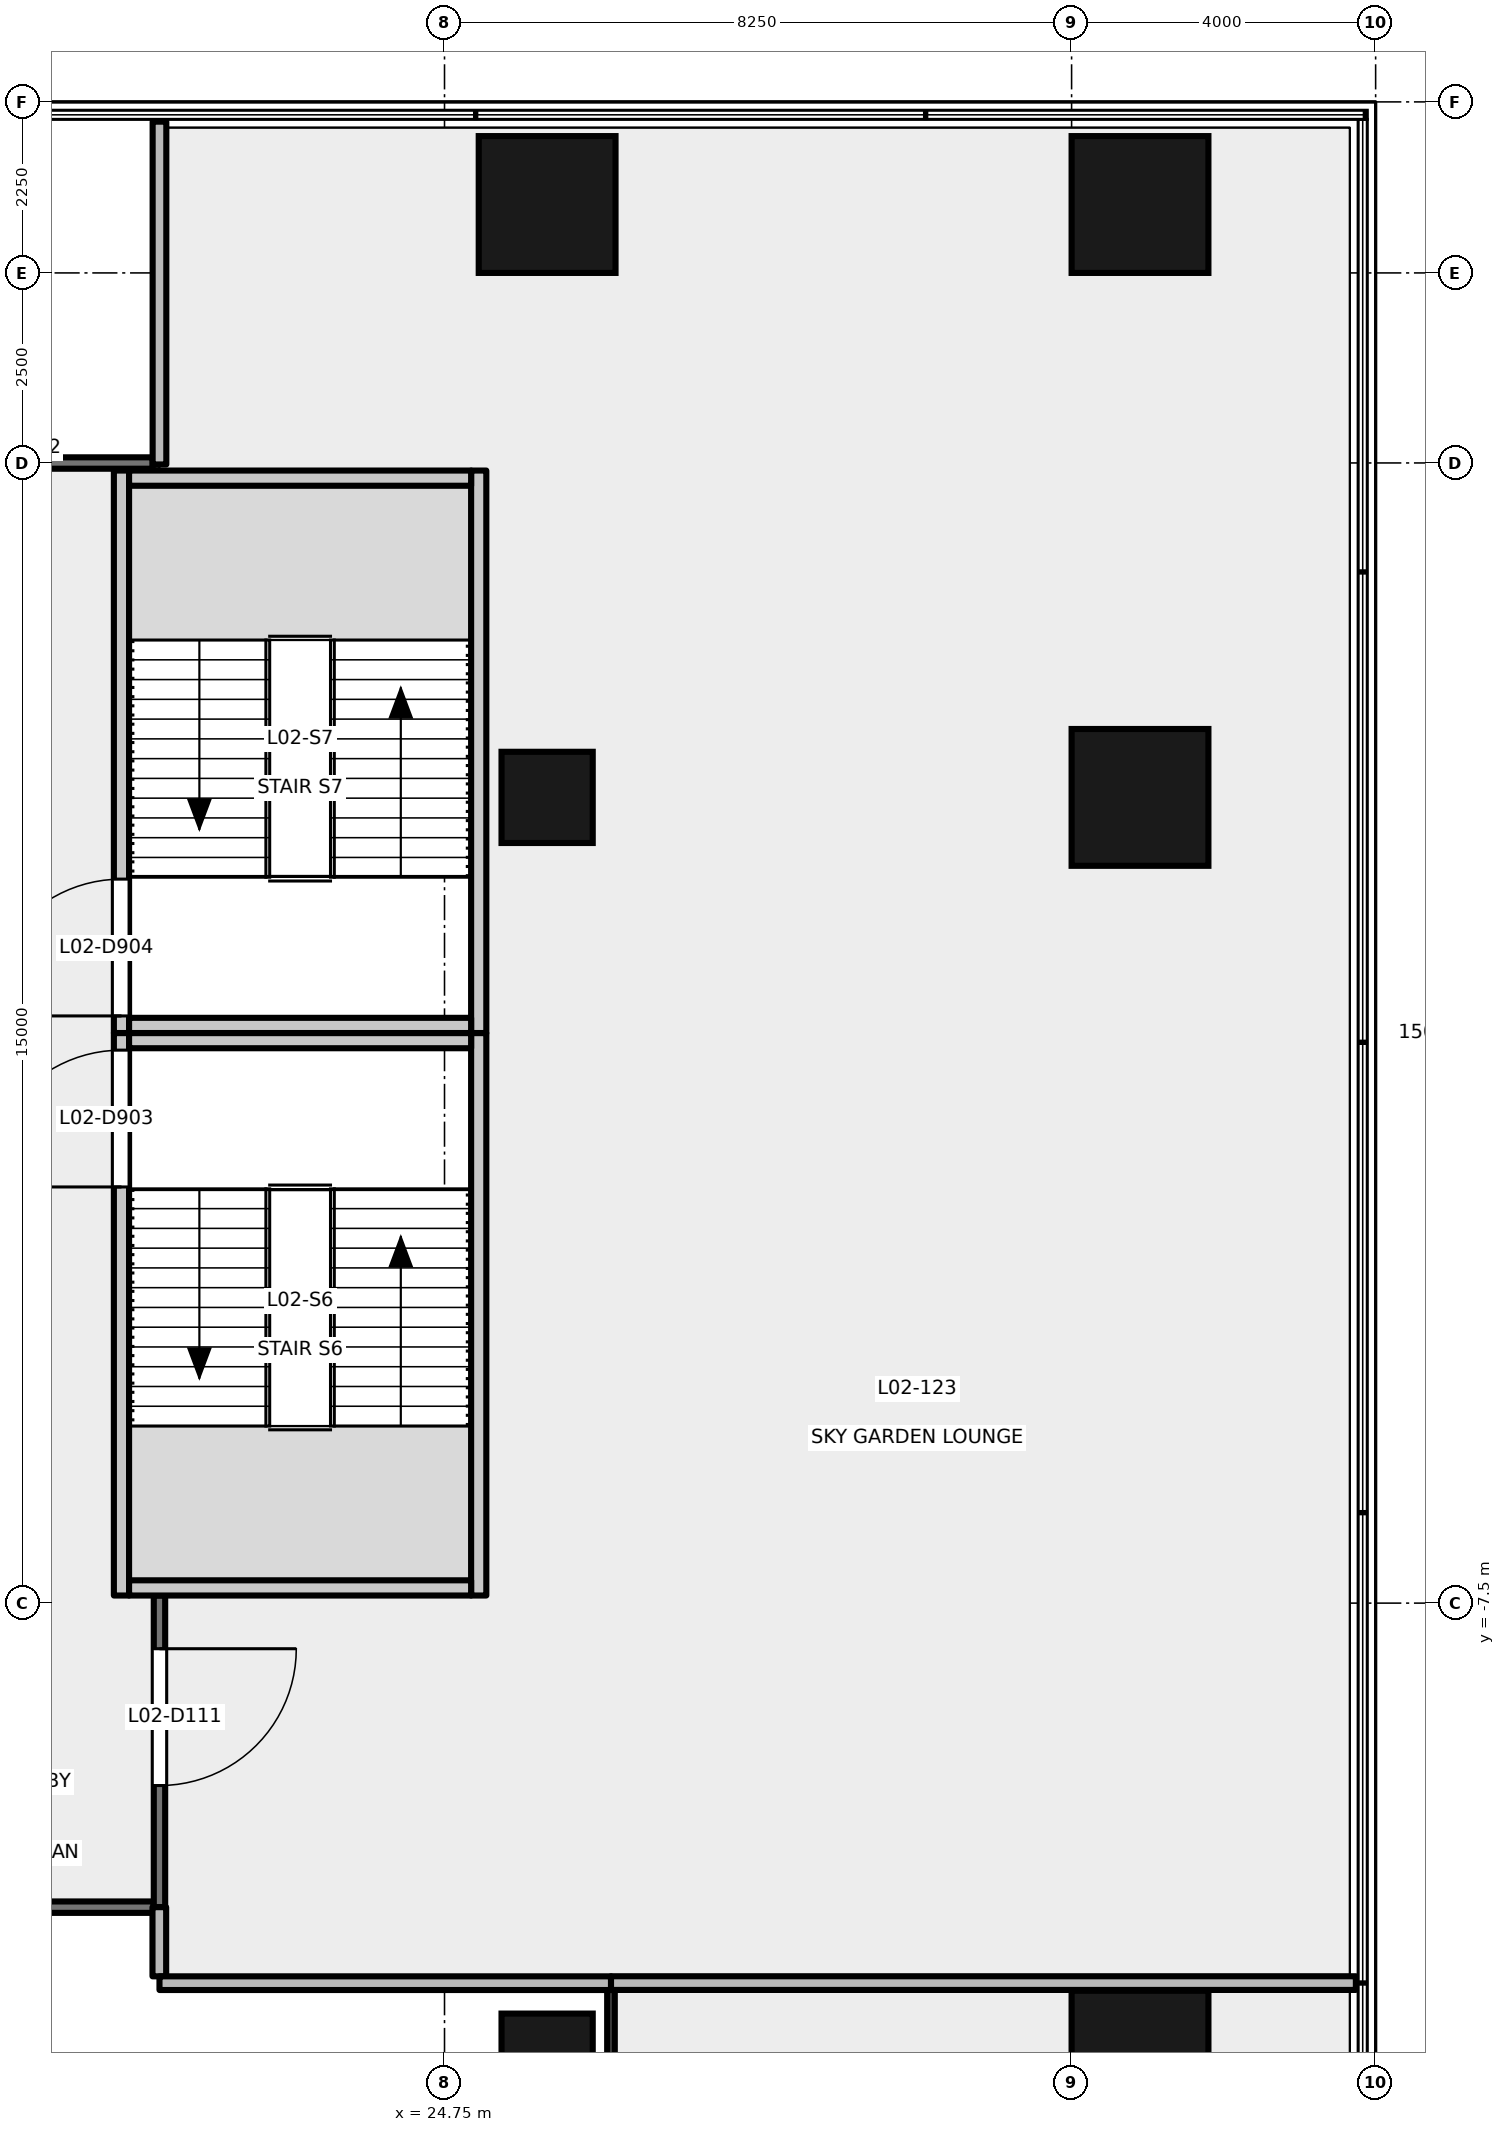
"""IFC4 building model, lengths in metres.
Left out: names, types, materials, properties, quantities, classifications, styles, units other than length and angle.
Written with IfcOpenShell. Run it as: python <this file> out.ifc"""

import sys

from ifc_helpers import new_model, si_unit, direction, frame, frame_2d, origin, origin_2d, place, context, subcontext, project, spatial, rectangle, extrude, element, fill, save


model = new_model("IFC4")
c1 = context("Model", 3, precision=1e-05, world=origin(), true_north=direction((0.0, 1.0)))
c2 = subcontext(c1, "Body", "Model", "MODEL_VIEW")
j1 = project(units=[si_unit("LENGTHUNIT", "METRE"), si_unit("PLANEANGLEUNIT", "RADIAN")], contexts=[c1])
p1 = place(None, origin())
s1 = spatial("IfcSite", under=j1, at=p1, CompositionType="ELEMENT")
p2 = place(p1, origin())
s2 = spatial("IfcBuilding", under=s1, at=p2, CompositionType="ELEMENT")
p3 = place(p2, frame((0.0, 0.0, 12.6)))
s3 = spatial("IfcBuildingStorey", under=s2, at=p3, CompositionType="ELEMENT", Elevation=12.6)
for number, where, z_axis, x_axis in (
    (1, (33.9, 10.9, -0.2), (0.0, 0.0, 1.0), (1.0, 0.0, 0.0)),
    (2, (33.9, -13.5, -0.2), (0.0, 0.0, 1.0), (0.0, 1.0, 0.0)),
    (3, (33.9, 3.1, -0.2), (0.0, 0.0, 1.0), (0.0, 1.0, 0.0)),
    (4, (26.1, 10.9, -0.2), (0.0, 0.0, 1.0), (1.0, 0.0, 0.0)),
):
    element("IfcColumn", number, at=place(p3, frame(where, z_axis=z_axis, x_axis=x_axis)), inside=s3, PredefinedType="COLUMN", context=c2, shape_type="SweptSolid", body=[
        extrude(rectangle(XDim=1.8, YDim=1.8, at=origin_2d()), origin(), (0.0, 0.0, 1.0), 4.8),
    ])
for number, where, z_axis, x_axis in (
    (5, (26.1, -13.5, -0.2), (0.0, 0.0, 1.0), (1.0, 0.0, 0.0)),
    (6, (26.1, 3.1, -0.2), (0.0, 0.0, 1.0), (1.0, 0.0, 0.0)),
):
    element("IfcColumn", number, at=place(p3, frame(where, z_axis=z_axis, x_axis=x_axis)), inside=s3, PredefinedType="COLUMN", context=c2, shape_type="SweptSolid", body=[
        extrude(rectangle(XDim=1.2, YDim=1.2, at=origin_2d()), origin(), (0.0, 0.0, 1.0), 4.8),
    ])
p4 = place(p3, frame((20.5, -7.4, -0.2), z_axis=(0.0, 0.0, 1.0), x_axis=(0.0, 1.0, 0.0)))
e7 = element("IfcWall", 7, at=p4, inside=s3, PredefinedType="SHEAR", context=c2, shape_type="SweptSolid", body=[
    extrude(rectangle(XDim=7.4, YDim=0.2, at=frame_2d((3.7, 0.0))), origin(), (0.0, 0.0, 1.0), 4.8),
])
p5 = place(p4, frame((5.375, 0.0, 0.2)))
e8 = element("IfcOpeningElement", 8, at=p5, cuts=e7, PredefinedType="OPENING", context=c2, shape_type="SweptSolid", body=[
    extrude(rectangle(XDim=1.8, YDim=2.1, at=frame_2d((0.9, 1.05))), frame((0.0, 0.111, 0.0), z_axis=(0.0, -1.0, 0.0), x_axis=(1.0, 0.0, 0.0)), (0.0, 0.0, 1.0), 0.221),
])
p6 = place(p3, frame((25.2, -7.4, -0.2), z_axis=(0.0, 0.0, 1.0), x_axis=(0.0, 1.0, 0.0)))
e9 = element("IfcWall", 9, at=p6, inside=s3, PredefinedType="SHEAR", context=c2, shape_type="SweptSolid", body=[
    extrude(rectangle(XDim=7.4, YDim=0.2, at=frame_2d((3.7, 0.0))), origin(), (0.0, 0.0, 1.0), 4.8),
])
for number, where, z_axis, x_axis in (
    (10, (20.6, -0.1, -0.2), (0.0, 0.0, 1.0), (1.0, 0.0, 0.0)),
    (11, (20.6, -7.3, -0.2), (0.0, 0.0, 1.0), (1.0, 0.0, 0.0)),
):
    element("IfcWall", number, at=place(p3, frame(where, z_axis=z_axis, x_axis=x_axis)), inside=s3, PredefinedType="SHEAR", context=c2, shape_type="SweptSolid", body=[
        extrude(rectangle(XDim=4.5, YDim=0.2, at=frame_2d((2.25, 0.0))), origin(), (0.0, 0.0, 1.0), 4.8),
    ])
p7 = place(p3, frame((20.5, 0.0, -0.2), z_axis=(0.0, 0.0, 1.0), x_axis=(0.0, 1.0, 0.0)))
e12 = element("IfcWall", 12, at=p7, inside=s3, PredefinedType="SHEAR", context=c2, shape_type="SweptSolid", body=[
    extrude(rectangle(XDim=7.4, YDim=0.2, at=frame_2d((3.7, 0.0))), origin(), (0.0, 0.0, 1.0), 4.8),
])
p8 = place(p7, frame((0.225, 0.0, 0.2)))
e13 = element("IfcOpeningElement", 13, at=p8, cuts=e12, PredefinedType="OPENING", context=c2, shape_type="SweptSolid", body=[
    extrude(rectangle(XDim=1.8, YDim=2.1, at=frame_2d((0.9, 1.05))), frame((0.0, 0.111, 0.0), z_axis=(0.0, -1.0, 0.0), x_axis=(1.0, 0.0, 0.0)), (0.0, 0.0, 1.0), 0.221),
])
p9 = place(p3, frame((25.2, 0.0, -0.2), z_axis=(0.0, 0.0, 1.0), x_axis=(0.0, 1.0, 0.0)))
e14 = element("IfcWall", 14, at=p9, inside=s3, PredefinedType="SHEAR", context=c2, shape_type="SweptSolid", body=[
    extrude(rectangle(XDim=7.4, YDim=0.2, at=frame_2d((3.7, 0.0))), origin(), (0.0, 0.0, 1.0), 4.8),
])
for number, where, z_axis, x_axis in (
    (15, (20.6, 7.3, -0.2), (0.0, 0.0, 1.0), (1.0, 0.0, 0.0)),
    (16, (20.6, 0.1, -0.2), (0.0, 0.0, 1.0), (1.0, 0.0, 0.0)),
):
    element("IfcWall", number, at=place(p3, frame(where, z_axis=z_axis, x_axis=x_axis)), inside=s3, PredefinedType="SHEAR", context=c2, shape_type="SweptSolid", body=[
        extrude(rectangle(XDim=4.5, YDim=0.2, at=frame_2d((2.25, 0.0))), origin(), (0.0, 0.0, 1.0), 4.8),
    ])
p10 = place(p3, frame((20.925, -11.5, 0.0), z_axis=(0.0, 0.0, 1.0), x_axis=(-1.0, 0.0, 0.0)))
e17 = element("IfcWall", 17, at=p10, inside=s3, PredefinedType="PARTITIONING", context=c2, shape_type="SweptSolid", body=[
    extrude(rectangle(XDim=2.965, YDim=0.15, at=frame_2d((1.482, 0.0))), origin(), (0.0, 0.0, 1.0), 4.3),
])
p11 = place(p3, frame((21.0, -7.4, 0.0), z_axis=(0.0, 0.0, 1.0), x_axis=(0.0, -1.0, 0.0)))
e18 = element("IfcWall", 18, at=p11, inside=s3, PredefinedType="PARTITIONING", context=c2, shape_type="SweptSolid", body=[
    extrude(rectangle(XDim=4.1, YDim=0.15, at=frame_2d((2.05, 0.0))), origin(), (0.0, 0.0, 1.0), 4.6),
])
p12 = place(p11, frame((0.7, 0.0, 0.0)))
e19 = element("IfcOpeningElement", 19, at=p12, cuts=e18, PredefinedType="OPENING", context=c2, shape_type="SweptSolid", body=[
    extrude(rectangle(XDim=1.8, YDim=2.1, at=frame_2d((0.9, 1.05))), frame((0.0, 0.085, 0.0), z_axis=(0.0, -1.0, 0.0), x_axis=(1.0, 0.0, 0.0)), (0.0, 0.0, 1.0), 0.171),
])
p13 = place(p3, frame((18.0, 7.499, 0.0), z_axis=(0.0, 0.0, 1.0), x_axis=(1.0, 0.0, 0.0)))
e20 = element("IfcWall", 20, at=p13, inside=s3, PredefinedType="PARTITIONING", context=c2, shape_type="SweptSolid", body=[
    extrude(rectangle(XDim=2.91, YDim=0.15, at=frame_2d((1.455, 0.0))), origin(), (0.0, 0.0, 1.0), 4.3),
])
p14 = place(p13, frame((0.628, 0.0, 0.0)))
e21 = element("IfcOpeningElement", 21, at=p14, cuts=e20, PredefinedType="OPENING", context=c2, shape_type="SweptSolid", body=[
    extrude(rectangle(XDim=0.9, YDim=2.1, at=frame_2d((0.45, 1.05))), frame((0.0, 0.085, 0.0), z_axis=(0.0, -1.0, 0.0), x_axis=(1.0, 0.0, 0.0)), (0.0, 0.0, 1.0), 0.171),
])
p15 = place(p3, frame((26.94, -16.25, 0.0), z_axis=(0.0, 0.0, 1.0), x_axis=(0.0, 1.0, 0.0)))
e22 = element("IfcWall", 22, at=p15, inside=s3, PredefinedType="PARTITIONING", context=c2, shape_type="SweptSolid", body=[
    extrude(rectangle(XDim=3.66, YDim=0.1, at=frame_2d((1.83, 0.0))), origin(), (0.0, 0.0, 1.0), 3.6),
])
p16 = place(p15, frame((0.475, 0.0, 0.9)))
e23 = element("IfcOpeningElement", 23, at=p16, cuts=e22, PredefinedType="OPENING", context=c2, shape_type="SweptSolid", body=[
    extrude(rectangle(XDim=1.2, YDim=1.2, at=frame_2d((0.6, 0.6))), frame((0.0, 0.061, 0.0), z_axis=(0.0, -1.0, 0.0), x_axis=(1.0, 0.0, 0.0)), (0.0, 0.0, 1.0), 0.121),
])
p17 = place(p3, frame((26.94, -12.499, 0.0), z_axis=(0.0, 0.0, 1.0), x_axis=(1.0, 0.0, 0.0)))
e24 = element("IfcWall", 24, at=p17, inside=s3, PredefinedType="PARTITIONING", context=c2, shape_type="SweptSolid", body=[
    extrude(rectangle(XDim=9.8, YDim=0.18, at=frame_2d((4.9, 0.0))), origin(), (0.0, 0.0, 1.0), 3.6),
])
p18 = place(p3, frame((20.998, -11.5, 0.0), z_axis=(0.0, 0.0, 1.0), x_axis=(0.0, -1.0, 0.0)))
e25 = element("IfcWall", 25, at=p18, inside=s3, PredefinedType="PARTITIONING", context=c2, shape_type="SweptSolid", body=[
    extrude(rectangle(XDim=0.91, YDim=0.18, at=frame_2d((0.455, 0.0))), origin(), (0.0, 0.0, 1.0), 4.6),
])
p19 = place(p3, frame((21.0, -12.5, 0.0), z_axis=(0.0, 0.0, 1.0), x_axis=(1.0, 0.0, 0.0)))
e26 = element("IfcWall", 26, at=p19, inside=s3, PredefinedType="PARTITIONING", context=c2, shape_type="SweptSolid", body=[
    extrude(rectangle(XDim=5.94, YDim=0.18, at=frame_2d((2.97, 0.0))), origin(), (0.0, 0.0, 1.0), 3.4),
])
p20 = place(p3, frame((21.0, 7.48, 0.0), z_axis=(0.0, 0.0, 1.0), x_axis=(0.0, 1.0, 0.0)))
e27 = element("IfcWall", 27, at=p20, inside=s3, PredefinedType="PARTITIONING", context=c2, shape_type="SweptSolid", body=[
    extrude(rectangle(XDim=4.51, YDim=0.18, at=frame_2d((2.255, 0.0))), origin(), (0.0, 0.0, 1.0), 3.6),
])
p21 = place(p5, origin())
e28 = element("IfcDoor", 28, at=p21, inside=s3, OperationType="DOUBLE_DOOR_SINGLE_SWING", PredefinedType="DOOR", context=c2, shape_type="SweptSolid", body=[
    extrude(rectangle(XDim=1.8, YDim=2.1, at=frame_2d((0.9, 1.05))), frame((0.0, 0.025, 0.0), z_axis=(0.0, -1.0, 0.0), x_axis=(1.0, 0.0, 0.0)), (0.0, 0.0, 1.0), 0.05),
])
fill(e8, e28)
p22 = place(p8, origin())
e29 = element("IfcDoor", 29, at=p22, inside=s3, OperationType="DOUBLE_DOOR_SINGLE_SWING", PredefinedType="DOOR", context=c2, shape_type="SweptSolid", body=[
    extrude(rectangle(XDim=1.8, YDim=2.1, at=frame_2d((0.9, 1.05))), frame((0.0, 0.025, 0.0), z_axis=(0.0, -1.0, 0.0), x_axis=(1.0, 0.0, 0.0)), (0.0, 0.0, 1.0), 0.05),
])
fill(e13, e29)
p23 = place(p12, origin())
e30 = element("IfcDoor", 30, at=p23, inside=s3, OperationType="DOUBLE_DOOR_SINGLE_SWING", PredefinedType="DOOR", context=c2, shape_type="SweptSolid", body=[
    extrude(rectangle(XDim=1.8, YDim=2.1, at=frame_2d((0.9, 1.05))), frame((0.0, 0.025, 0.0), z_axis=(0.0, -1.0, 0.0), x_axis=(1.0, 0.0, 0.0)), (0.0, 0.0, 1.0), 0.05),
])
fill(e19, e30)
save(model, sys.argv[1])
